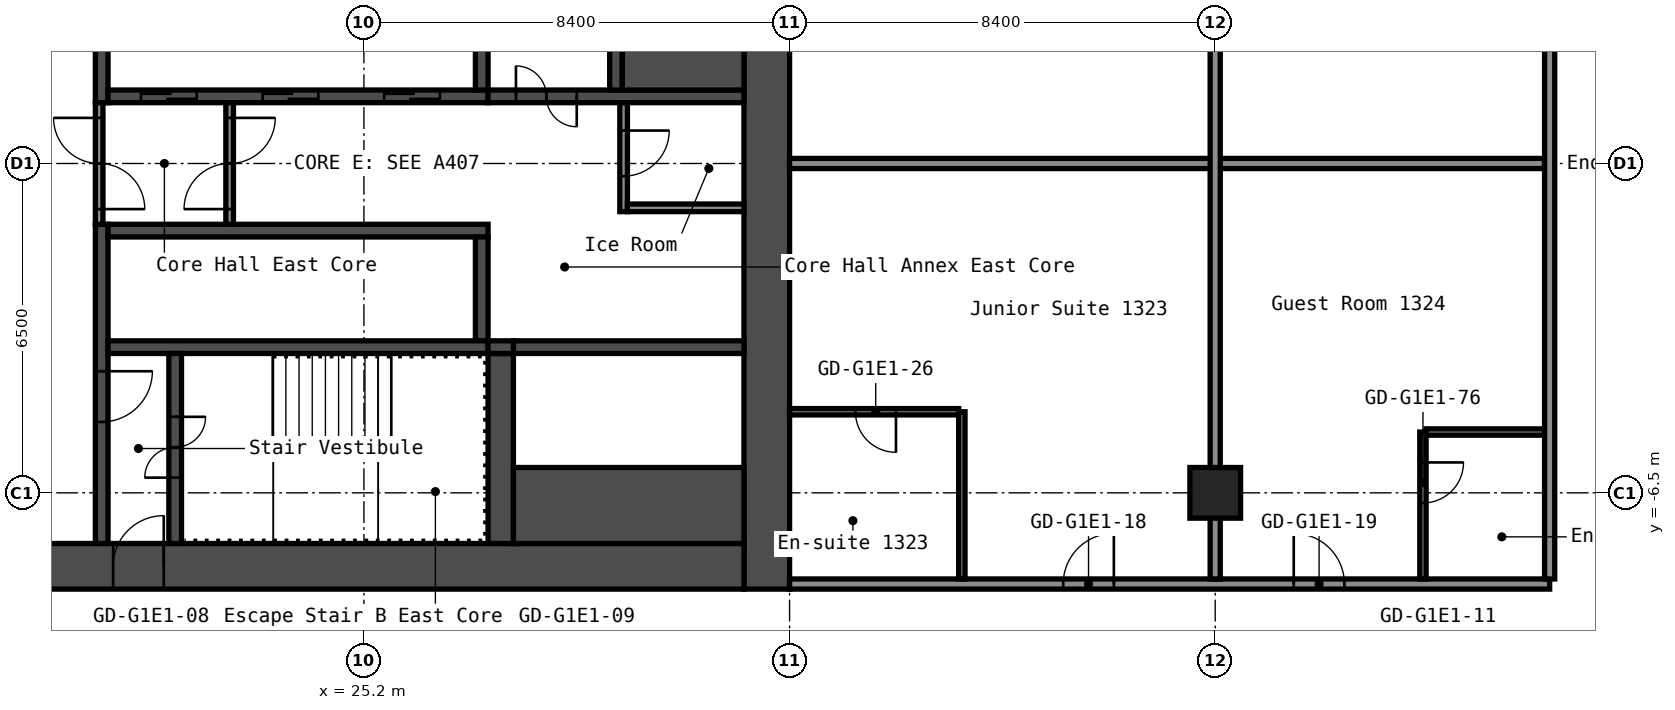
"""IFC4 building model, lengths in metres.
Left out: names, types, materials, properties, quantities, classifications, styles, units other than length and angle.
Written with IfcOpenShell. Run it as: python <this file> out.ifc"""

import sys

from ifc_helpers import new_model, si_unit, direction, frame, frame_2d, origin, origin_2d, place, context, subcontext, project, spatial, rectangle, hollow_rectangle, extrude, element, fill, save


model = new_model("IFC4")
c1 = context("Model", 3, precision=1e-05, world=origin(), true_north=direction((0.0, 1.0)))
c2 = subcontext(c1, "Body", "Model", "MODEL_VIEW")
j1 = project(units=[si_unit("LENGTHUNIT", "METRE"), si_unit("PLANEANGLEUNIT", "RADIAN")], contexts=[c1])
p1 = place(None, origin())
s1 = spatial("IfcSite", under=j1, at=p1, CompositionType="ELEMENT")
p2 = place(p1, origin())
s2 = spatial("IfcBuilding", under=s1, at=p2, CompositionType="ELEMENT")
p3 = place(p2, frame((0.0, 0.0, 48.6)))
s3 = spatial("IfcBuildingStorey", under=s2, at=p3, CompositionType="ELEMENT", Elevation=48.6)
p4 = place(p3, frame((42.0, -6.5, 0.0), z_axis=(0.0, 0.0, 1.0), x_axis=(1.0, 0.0, 0.0)))
e1 = element("IfcColumn", 1, at=p4, inside=s3, PredefinedType="COLUMN", context=c2, shape_type="SweptSolid", body=[
    extrude(hollow_rectangle(XDim=1.0, YDim=1.0, WallThickness=0.04, at=origin_2d()), origin(), (0.0, 0.0, 1.0), 2.8),
])
p5 = place(p3, frame((33.15, -8.4, 0.0), z_axis=(0.0, 0.0, 1.0), x_axis=(0.0, 1.0, 0.0)))
e2 = element("IfcWall", 2, at=p5, inside=s3, PredefinedType="SHEAR", context=c2, shape_type="SweptSolid", body=[
    extrude(rectangle(XDim=16.8, YDim=0.9, at=frame_2d((8.4, 0.0))), origin(), (0.0, 0.0, 1.0), 2.8),
])
p6 = place(p3, frame((17.7, -7.95, 0.0), z_axis=(0.0, 0.0, 1.0), x_axis=(1.0, 0.0, 0.0)))
e3 = element("IfcWall", 3, at=p6, inside=s3, PredefinedType="SHEAR", context=c2, shape_type="SweptSolid", body=[
    extrude(rectangle(XDim=15.0, YDim=0.9, at=frame_2d((7.5, 0.0))), origin(), (0.0, 0.0, 1.0), 2.8),
])
p7 = place(p6, frame((2.55, 0.0, 0.0)))
e4 = element("IfcOpeningElement", 4, at=p7, cuts=e3, PredefinedType="OPENING", context=c2, shape_type="SweptSolid", body=[
    extrude(rectangle(XDim=1.0, YDim=2.1, at=frame_2d((0.5, 1.05))), frame((0.0, 0.46, 0.0), z_axis=(0.0, -1.0, 0.0), x_axis=(1.0, 0.0, 0.0)), (0.0, 0.0, 1.0), 0.92),
])
p8 = place(p3, frame((20.025, 1.2, 0.0), z_axis=(0.0, 0.0, 1.0), x_axis=(0.0, 1.0, 0.0)))
e5 = element("IfcWall", 5, at=p8, inside=s3, PredefinedType="SHEAR", context=c2, shape_type="SweptSolid", body=[
    extrude(rectangle(XDim=6.3, YDim=0.25, at=frame_2d((3.15, 0.0))), origin(), (0.0, 0.0, 1.0), 2.8),
])
p9 = place(p3, frame((20.025, -7.5, 0.0), z_axis=(0.0, 0.0, 1.0), x_axis=(0.0, 1.0, 0.0)))
e6 = element("IfcWall", 6, at=p9, inside=s3, PredefinedType="SHEAR", context=c2, shape_type="SweptSolid", body=[
    extrude(rectangle(XDim=6.3, YDim=0.25, at=frame_2d((3.15, 0.0))), origin(), (0.0, 0.0, 1.0), 2.8),
])
p10 = place(p9, frame((2.4, 0.0, 0.0)))
e7 = element("IfcOpeningElement", 7, at=p10, cuts=e6, PredefinedType="OPENING", context=c2, shape_type="SweptSolid", body=[
    extrude(rectangle(XDim=1.0, YDim=2.1, at=frame_2d((0.5, 1.05))), frame((0.0, 0.135, 0.0), z_axis=(0.0, -1.0, 0.0), x_axis=(1.0, 0.0, 0.0)), (0.0, 0.0, 1.0), 0.27),
])
p11 = place(p3, frame((20.15, 1.325, 0.0), z_axis=(0.0, 0.0, 1.0), x_axis=(1.0, 0.0, 0.0)))
e8 = element("IfcWall", 8, at=p11, inside=s3, PredefinedType="SHEAR", context=c2, shape_type="SweptSolid", body=[
    extrude(rectangle(XDim=7.5, YDim=0.25, at=frame_2d((3.75, 0.0))), origin(), (0.0, 0.0, 1.0), 2.8),
])
p12 = place(p11, frame((0.65, 0.0, 0.0)))
e9 = element("IfcOpeningElement", 9, at=p12, cuts=e8, PredefinedType="OPENING", context=c2, shape_type="SweptSolid", body=[
    extrude(rectangle(XDim=1.1, YDim=2.1, at=frame_2d((0.55, 1.05))), frame((0.0, 0.135, 0.0), z_axis=(0.0, -1.0, 0.0), x_axis=(1.0, 0.0, 0.0)), (0.0, 0.0, 1.0), 0.27),
])
p13 = place(p11, frame((3.05, 0.0, 0.0)))
e10 = element("IfcOpeningElement", 10, at=p13, cuts=e8, PredefinedType="OPENING", context=c2, shape_type="SweptSolid", body=[
    extrude(rectangle(XDim=1.1, YDim=2.1, at=frame_2d((0.55, 1.05))), frame((0.0, 0.135, 0.0), z_axis=(0.0, -1.0, 0.0), x_axis=(1.0, 0.0, 0.0)), (0.0, 0.0, 1.0), 0.27),
])
p14 = place(p11, frame((5.45, 0.0, 0.0)))
e11 = element("IfcOpeningElement", 11, at=p14, cuts=e8, PredefinedType="OPENING", context=c2, shape_type="SweptSolid", body=[
    extrude(rectangle(XDim=1.1, YDim=2.1, at=frame_2d((0.55, 1.05))), frame((0.0, 0.135, 0.0), z_axis=(0.0, -1.0, 0.0), x_axis=(1.0, 0.0, 0.0)), (0.0, 0.0, 1.0), 0.27),
])
p15 = place(p3, frame((27.525, 1.45, 0.0), z_axis=(0.0, 0.0, 1.0), x_axis=(0.0, 1.0, 0.0)))
e12 = element("IfcWall", 12, at=p15, inside=s3, PredefinedType="SHEAR", context=c2, shape_type="SweptSolid", body=[
    extrude(rectangle(XDim=2.05, YDim=0.25, at=frame_2d((1.025, 0.0))), origin(), (0.0, 0.0, 1.0), 2.8),
])
p16 = place(p3, frame((27.65, 1.325, 0.0), z_axis=(0.0, 0.0, 1.0), x_axis=(1.0, 0.0, 0.0)))
e13 = element("IfcWall", 13, at=p16, inside=s3, PredefinedType="SHEAR", context=c2, shape_type="SweptSolid", body=[
    extrude(rectangle(XDim=5.05, YDim=0.25, at=frame_2d((2.525, 0.0))), origin(), (0.0, 0.0, 1.0), 2.8),
])
p17 = place(p16, frame((0.55, 0.0, 0.0)))
e14 = element("IfcOpeningElement", 14, at=p17, cuts=e13, PredefinedType="OPENING", context=c2, shape_type="SweptSolid", body=[
    extrude(rectangle(XDim=1.2, YDim=2.1, at=frame_2d((0.6, 1.05))), frame((0.0, 0.135, 0.0), z_axis=(0.0, -1.0, 0.0), x_axis=(1.0, 0.0, 0.0)), (0.0, 0.0, 1.0), 0.27),
])
p18 = place(p3, frame((30.175, 1.45, 0.0), z_axis=(0.0, 0.0, 1.0), x_axis=(0.0, 1.0, 0.0)))
e15 = element("IfcWall", 15, at=p18, inside=s3, PredefinedType="SHEAR", context=c2, shape_type="SweptSolid", body=[
    extrude(rectangle(XDim=6.05, YDim=0.25, at=frame_2d((3.025, 0.0))), origin(), (0.0, 0.0, 1.0), 2.8),
])
p19 = place(p18, frame((2.625, 0.0, 0.0)))
e16 = element("IfcOpeningElement", 16, at=p19, cuts=e15, PredefinedType="OPENING", context=c2, shape_type="SweptSolid", body=[
    extrude(rectangle(XDim=1.1, YDim=2.1, at=frame_2d((0.55, 1.05))), frame((0.0, 0.135, 0.0), z_axis=(0.0, -1.0, 0.0), x_axis=(1.0, 0.0, 0.0)), (0.0, 0.0, 1.0), 0.27),
])
p20 = place(p3, frame((30.3, 2.375, 0.0), z_axis=(0.0, 0.0, 1.0), x_axis=(1.0, 0.0, 0.0)))
e17 = element("IfcWall", 17, at=p20, inside=s3, PredefinedType="SHEAR", context=c2, shape_type="SweptSolid", body=[
    extrude(rectangle(XDim=2.4, YDim=1.85, at=frame_2d((1.2, 0.0))), origin(), (0.0, 0.0, 1.0), 2.8),
])
p21 = place(p3, frame((20.15, -1.325, 0.0), z_axis=(0.0, 0.0, 1.0), x_axis=(1.0, 0.0, 0.0)))
e18 = element("IfcWall", 18, at=p21, inside=s3, PredefinedType="SHEAR", context=c2, shape_type="SweptSolid", body=[
    extrude(rectangle(XDim=7.5, YDim=0.25, at=frame_2d((3.75, 0.0))), origin(), (0.0, 0.0, 1.0), 2.8),
])
p22 = place(p3, frame((27.525, -3.5, 0.0), z_axis=(0.0, 0.0, 1.0), x_axis=(0.0, 1.0, 0.0)))
e19 = element("IfcWall", 19, at=p22, inside=s3, PredefinedType="SHEAR", context=c2, shape_type="SweptSolid", body=[
    extrude(rectangle(XDim=2.05, YDim=0.25, at=frame_2d((1.025, 0.0))), origin(), (0.0, 0.0, 1.0), 2.8),
])
p23 = place(p3, frame((20.15, -3.625, 0.0), z_axis=(0.0, 0.0, 1.0), x_axis=(1.0, 0.0, 0.0)))
e20 = element("IfcWall", 20, at=p23, inside=s3, PredefinedType="SHEAR", context=c2, shape_type="SweptSolid", body=[
    extrude(rectangle(XDim=7.5, YDim=0.25, at=frame_2d((3.75, 0.0))), origin(), (0.0, 0.0, 1.0), 2.8),
])
p24 = place(p3, frame((21.475, -7.5, 0.0), z_axis=(0.0, 0.0, 1.0), x_axis=(0.0, 1.0, 0.0)))
e21 = element("IfcWall", 21, at=p24, inside=s3, PredefinedType="SHEAR", context=c2, shape_type="SweptSolid", body=[
    extrude(rectangle(XDim=3.75, YDim=0.25, at=frame_2d((1.875, 0.0))), origin(), (0.0, 0.0, 1.0), 2.8),
])
p25 = place(p24, frame((1.3, 0.0, 0.0)))
e22 = element("IfcOpeningElement", 22, at=p25, cuts=e21, PredefinedType="OPENING", context=c2, shape_type="SweptSolid", body=[
    extrude(rectangle(XDim=1.2, YDim=2.1, at=frame_2d((0.6, 1.05))), frame((0.0, 0.135, 0.0), z_axis=(0.0, -1.0, 0.0), x_axis=(1.0, 0.0, 0.0)), (0.0, 0.0, 1.0), 0.27),
])
p26 = place(p3, frame((27.9, -7.5, 0.0), z_axis=(0.0, 0.0, 1.0), x_axis=(0.0, 1.0, 0.0)))
e23 = element("IfcWall", 23, at=p26, inside=s3, PredefinedType="SHEAR", context=c2, shape_type="SweptSolid", body=[
    extrude(rectangle(XDim=3.75, YDim=0.5, at=frame_2d((1.875, 0.0))), origin(), (0.0, 0.0, 1.0), 2.8),
])
p27 = place(p3, frame((28.15, -3.625, 0.0), z_axis=(0.0, 0.0, 1.0), x_axis=(1.0, 0.0, 0.0)))
e24 = element("IfcWall", 24, at=p27, inside=s3, PredefinedType="SHEAR", context=c2, shape_type="SweptSolid", body=[
    extrude(rectangle(XDim=4.55, YDim=0.25, at=frame_2d((2.275, 0.0))), origin(), (0.0, 0.0, 1.0), 2.8),
])
p28 = place(p3, frame((28.15, -6.75, 0.0), z_axis=(0.0, 0.0, 1.0), x_axis=(1.0, 0.0, 0.0)))
e25 = element("IfcWall", 25, at=p28, inside=s3, PredefinedType="SHEAR", context=c2, shape_type="SweptSolid", body=[
    extrude(rectangle(XDim=4.55, YDim=1.5, at=frame_2d((2.275, 0.0))), origin(), (0.0, 0.0, 1.0), 2.8),
])
p29 = place(p3, frame((27.65, -3.625, 0.0), z_axis=(0.0, 0.0, 1.0), x_axis=(1.0, 0.0, 0.0)))
e26 = element("IfcWall", 26, at=p29, inside=s3, PredefinedType="SHEAR", context=c2, shape_type="SweptSolid", body=[
    extrude(rectangle(XDim=0.5, YDim=0.25, at=frame_2d((0.25, 0.0))), origin(), (0.0, 0.0, 1.0), 2.8),
])
p30 = place(p3, frame((19.975, -1.2, 0.0), z_axis=(0.0, 0.0, 1.0), x_axis=(0.0, 1.0, 0.0)))
e27 = element("IfcWall", 27, at=p30, inside=s3, PredefinedType="PARTITIONING", context=c2, shape_type="SweptSolid", body=[
    extrude(rectangle(XDim=2.4, YDim=0.15, at=frame_2d((1.2, 0.0))), origin(), (0.0, 0.0, 1.0), 2.8),
])
p31 = place(p30, frame((0.3, 0.0, 0.0)))
e28 = element("IfcOpeningElement", 28, at=p31, cuts=e27, PredefinedType="OPENING", context=c2, shape_type="SweptSolid", body=[
    extrude(rectangle(XDim=1.8, YDim=2.1, at=frame_2d((0.9, 1.05))), frame((0.0, 0.085, 0.0), z_axis=(0.0, -1.0, 0.0), x_axis=(1.0, 0.0, 0.0)), (0.0, 0.0, 1.0), 0.17),
])
p32 = place(p3, frame((22.55, -1.2, 0.0), z_axis=(0.0, 0.0, 1.0), x_axis=(0.0, 1.0, 0.0)))
e29 = element("IfcWall", 29, at=p32, inside=s3, PredefinedType="PARTITIONING", context=c2, shape_type="SweptSolid", body=[
    extrude(rectangle(XDim=2.4, YDim=0.15, at=frame_2d((1.2, 0.0))), origin(), (0.0, 0.0, 1.0), 2.8),
])
p33 = place(p32, frame((0.3, 0.0, 0.0)))
e30 = element("IfcOpeningElement", 30, at=p33, cuts=e29, PredefinedType="OPENING", context=c2, shape_type="SweptSolid", body=[
    extrude(rectangle(XDim=1.8, YDim=2.1, at=frame_2d((0.9, 1.05))), frame((0.0, 0.085, 0.0), z_axis=(0.0, -1.0, 0.0), x_axis=(1.0, 0.0, 0.0)), (0.0, 0.0, 1.0), 0.17),
])
p34 = place(p3, frame((30.325, -0.95, 0.0), z_axis=(0.0, 0.0, 1.0), x_axis=(0.0, 1.0, 0.0)))
e31 = element("IfcWall", 31, at=p34, inside=s3, PredefinedType="PARTITIONING", context=c2, shape_type="SweptSolid", body=[
    extrude(rectangle(XDim=2.15, YDim=0.15, at=frame_2d((1.075, 0.0))), origin(), (0.0, 0.0, 1.0), 2.8),
])
p35 = place(p34, frame((0.7, 0.0, 0.0)))
e32 = element("IfcOpeningElement", 32, at=p35, cuts=e31, PredefinedType="OPENING", context=c2, shape_type="SweptSolid", body=[
    extrude(rectangle(XDim=0.9, YDim=2.1, at=frame_2d((0.45, 1.05))), frame((0.0, 0.085, 0.0), z_axis=(0.0, -1.0, 0.0), x_axis=(1.0, 0.0, 0.0)), (0.0, 0.0, 1.0), 0.17),
])
p36 = place(p3, frame((30.4, -0.875, 0.0), z_axis=(0.0, 0.0, 1.0), x_axis=(1.0, 0.0, 0.0)))
e33 = element("IfcWall", 33, at=p36, inside=s3, PredefinedType="PARTITIONING", context=c2, shape_type="SweptSolid", body=[
    extrude(rectangle(XDim=2.3, YDim=0.15, at=frame_2d((1.15, 0.0))), origin(), (0.0, 0.0, 1.0), 2.8),
])
p37 = place(p3, frame((33.6, -8.3, 0.0), z_axis=(0.0, 0.0, 1.0), x_axis=(1.0, 0.0, 0.0)))
e34 = element("IfcWall", 34, at=p37, inside=s3, PredefinedType="PARTITIONING", context=c2, shape_type="SweptSolid", body=[
    extrude(rectangle(XDim=15.0, YDim=0.2, at=frame_2d((7.5, 0.0))), origin(), (0.0, 0.0, 1.0), 2.8),
])
p38 = place(p37, frame((5.4, 0.0, 0.0)))
e35 = element("IfcOpeningElement", 35, at=p38, cuts=e34, PredefinedType="OPENING", context=c2, shape_type="SweptSolid", body=[
    extrude(rectangle(XDim=1.0, YDim=2.1, at=frame_2d((0.5, 1.05))), frame((0.0, 0.11, 0.0), z_axis=(0.0, -1.0, 0.0), x_axis=(1.0, 0.0, 0.0)), (0.0, 0.0, 1.0), 0.22),
])
p39 = place(p37, frame((9.95, 0.0, 0.0)))
e36 = element("IfcOpeningElement", 36, at=p39, cuts=e34, PredefinedType="OPENING", context=c2, shape_type="SweptSolid", body=[
    extrude(rectangle(XDim=1.0, YDim=2.1, at=frame_2d((0.5, 1.05))), frame((0.0, 0.11, 0.0), z_axis=(0.0, -1.0, 0.0), x_axis=(1.0, 0.0, 0.0)), (0.0, 0.0, 1.0), 0.22),
])
p40 = place(p3, frame((46.163, -5.3, 0.0), z_axis=(0.0, 0.0, 1.0), x_axis=(1.0, 0.0, 0.0)))
e37 = element("IfcWall", 37, at=p40, inside=s3, PredefinedType="PARTITIONING", context=c2, shape_type="SweptSolid", body=[
    extrude(rectangle(XDim=2.337, YDim=0.125, at=frame_2d((1.169, 0.0))), origin(), (0.0, 0.0, 1.0), 2.8),
])
p41 = place(p3, frame((33.6, -4.9, 0.0), z_axis=(0.0, 0.0, 1.0), x_axis=(1.0, 0.0, 0.0)))
e38 = element("IfcWall", 38, at=p41, inside=s3, PredefinedType="PARTITIONING", context=c2, shape_type="SweptSolid", body=[
    extrude(rectangle(XDim=3.337, YDim=0.125, at=frame_2d((1.669, 0.0))), origin(), (0.0, 0.0, 1.0), 2.8),
])
p42 = place(p41, frame((1.3, 0.0, 0.0)))
e39 = element("IfcOpeningElement", 39, at=p42, cuts=e38, PredefinedType="OPENING", context=c2, shape_type="SweptSolid", body=[
    extrude(rectangle(XDim=0.8, YDim=2.1, at=frame_2d((0.4, 1.05))), frame((0.0, 0.073, 0.0), z_axis=(0.0, -1.0, 0.0), x_axis=(1.0, 0.0, 0.0)), (0.0, 0.0, 1.0), 0.145),
])
p43 = place(p3, frame((33.6, 0.0, 0.0), z_axis=(0.0, 0.0, 1.0), x_axis=(1.0, 0.0, 0.0)))
e40 = element("IfcWall", 40, at=p43, inside=s3, PredefinedType="PARTITIONING", context=c2, shape_type="SweptSolid", body=[
    extrude(rectangle(XDim=14.9, YDim=0.2, at=frame_2d((7.45, 0.0))), origin(), (0.0, 0.0, 1.0), 2.8),
])
p44 = place(p3, frame((37.0, -8.2, 0.0), z_axis=(0.0, 0.0, 1.0), x_axis=(0.0, 1.0, 0.0)))
e41 = element("IfcWall", 41, at=p44, inside=s3, PredefinedType="PARTITIONING", context=c2, shape_type="SweptSolid", body=[
    extrude(rectangle(XDim=3.3, YDim=0.125, at=frame_2d((1.65, 0.0))), origin(), (0.0, 0.0, 1.0), 2.8),
])
p45 = place(p3, frame((42.0, -8.2, 0.0), z_axis=(0.0, 0.0, 1.0), x_axis=(0.0, 1.0, 0.0)))
e42 = element("IfcWall", 42, at=p45, inside=s3, PredefinedType="PARTITIONING", context=c2, shape_type="SweptSolid", body=[
    extrude(rectangle(XDim=16.4, YDim=0.2, at=frame_2d((8.2, 0.0))), origin(), (0.0, 0.0, 1.0), 2.8),
])
p46 = place(p3, frame((46.1, -8.2, 0.0), z_axis=(0.0, 0.0, 1.0), x_axis=(0.0, 1.0, 0.0)))
e43 = element("IfcWall", 43, at=p46, inside=s3, PredefinedType="PARTITIONING", context=c2, shape_type="SweptSolid", body=[
    extrude(rectangle(XDim=2.9, YDim=0.125, at=frame_2d((1.45, 0.0))), origin(), (0.0, 0.0, 1.0), 2.8),
])
p47 = place(p46, frame((1.5, 0.0, 0.0)))
e44 = element("IfcOpeningElement", 44, at=p47, cuts=e43, PredefinedType="OPENING", context=c2, shape_type="SweptSolid", body=[
    extrude(rectangle(XDim=0.8, YDim=2.1, at=frame_2d((0.4, 1.05))), frame((0.0, 0.073, 0.0), z_axis=(0.0, -1.0, 0.0), x_axis=(1.0, 0.0, 0.0)), (0.0, 0.0, 1.0), 0.145),
])
p48 = place(p3, frame((48.6, -8.2, 0.0), z_axis=(0.0, 0.0, 1.0), x_axis=(0.0, 1.0, 0.0)))
e45 = element("IfcWall", 45, at=p48, inside=s3, PredefinedType="PARTITIONING", context=c2, shape_type="SweptSolid", body=[
    extrude(rectangle(XDim=16.4, YDim=0.2, at=frame_2d((8.2, 0.0))), origin(), (0.0, 0.0, 1.0), 2.8),
])
p49 = place(p7, origin())
e46 = element("IfcDoor", 46, at=p49, inside=s3, OperationType="SINGLE_SWING_LEFT", PredefinedType="DOOR", context=c2, shape_type="SweptSolid", body=[
    extrude(rectangle(XDim=1.0, YDim=2.1, at=frame_2d((0.5, 1.05))), frame((0.0, 0.025, 0.0), z_axis=(0.0, -1.0, 0.0), x_axis=(1.0, 0.0, 0.0)), (0.0, 0.0, 1.0), 0.05),
])
fill(e4, e46)
p50 = place(p25, origin())
e47 = element("IfcDoor", 47, at=p50, inside=s3, OperationType="DOUBLE_DOOR_SINGLE_SWING", PredefinedType="DOOR", context=c2, shape_type="SweptSolid", body=[
    extrude(rectangle(XDim=1.2, YDim=2.1, at=frame_2d((0.6, 1.05))), frame((0.0, 0.025, 0.0), z_axis=(0.0, -1.0, 0.0), x_axis=(1.0, 0.0, 0.0)), (0.0, 0.0, 1.0), 0.05),
])
fill(e22, e47)
p51 = place(p10, origin())
e48 = element("IfcDoor", 48, at=p51, inside=s3, OperationType="SINGLE_SWING_RIGHT", PredefinedType="DOOR", context=c2, shape_type="SweptSolid", body=[
    extrude(rectangle(XDim=1.0, YDim=2.1, at=frame_2d((0.5, 1.05))), frame((0.0, 0.025, 0.0), z_axis=(0.0, -1.0, 0.0), x_axis=(1.0, 0.0, 0.0)), (0.0, 0.0, 1.0), 0.05),
])
fill(e7, e48)
p52 = place(p17, origin())
e49 = element("IfcDoor", 49, at=p52, inside=s3, OperationType="DOUBLE_DOOR_SINGLE_SWING", PredefinedType="DOOR", context=c2, shape_type="SweptSolid", body=[
    extrude(rectangle(XDim=1.2, YDim=2.1, at=frame_2d((0.6, 1.05))), frame((0.0, 0.025, 0.0), z_axis=(0.0, -1.0, 0.0), x_axis=(1.0, 0.0, 0.0)), (0.0, 0.0, 1.0), 0.05),
])
fill(e14, e49)
p53 = place(p31, origin())
e50 = element("IfcDoor", 50, at=p53, inside=s3, OperationType="DOUBLE_DOOR_SINGLE_SWING", PredefinedType="DOOR", context=c2, shape_type="SweptSolid", body=[
    extrude(rectangle(XDim=1.8, YDim=2.1, at=frame_2d((0.9, 1.05))), frame((0.0, 0.025, 0.0), z_axis=(0.0, -1.0, 0.0), x_axis=(1.0, 0.0, 0.0)), (0.0, 0.0, 1.0), 0.05),
])
fill(e28, e50)
p54 = place(p33, origin())
e51 = element("IfcDoor", 51, at=p54, inside=s3, OperationType="DOUBLE_DOOR_SINGLE_SWING", PredefinedType="DOOR", context=c2, shape_type="SweptSolid", body=[
    extrude(rectangle(XDim=1.8, YDim=2.1, at=frame_2d((0.9, 1.05))), frame((0.0, 0.025, 0.0), z_axis=(0.0, -1.0, 0.0), x_axis=(1.0, 0.0, 0.0)), (0.0, 0.0, 1.0), 0.05),
])
fill(e30, e51)
p55 = place(p35, origin())
e52 = element("IfcDoor", 52, at=p55, inside=s3, OperationType="SINGLE_SWING_RIGHT", PredefinedType="DOOR", context=c2, shape_type="SweptSolid", body=[
    extrude(rectangle(XDim=0.9, YDim=2.1, at=frame_2d((0.45, 1.05))), frame((0.0, 0.025, 0.0), z_axis=(0.0, -1.0, 0.0), x_axis=(1.0, 0.0, 0.0)), (0.0, 0.0, 1.0), 0.05),
])
fill(e32, e52)
p56 = place(p12, origin())
e53 = element("IfcDoor", 53, at=p56, inside=s3, OperationType="DOUBLE_DOOR_SLIDING", PredefinedType="DOOR", context=c2, shape_type="SweptSolid", body=[
    extrude(rectangle(XDim=1.1, YDim=2.1, at=frame_2d((0.55, 1.05))), frame((0.0, 0.025, 0.0), z_axis=(0.0, -1.0, 0.0), x_axis=(1.0, 0.0, 0.0)), (0.0, 0.0, 1.0), 0.05),
])
fill(e9, e53)
p57 = place(p13, origin())
e54 = element("IfcDoor", 54, at=p57, inside=s3, OperationType="DOUBLE_DOOR_SLIDING", PredefinedType="DOOR", context=c2, shape_type="SweptSolid", body=[
    extrude(rectangle(XDim=1.1, YDim=2.1, at=frame_2d((0.55, 1.05))), frame((0.0, 0.025, 0.0), z_axis=(0.0, -1.0, 0.0), x_axis=(1.0, 0.0, 0.0)), (0.0, 0.0, 1.0), 0.05),
])
fill(e10, e54)
p58 = place(p14, origin())
e55 = element("IfcDoor", 55, at=p58, inside=s3, OperationType="DOUBLE_DOOR_SLIDING", PredefinedType="DOOR", context=c2, shape_type="SweptSolid", body=[
    extrude(rectangle(XDim=1.1, YDim=2.1, at=frame_2d((0.55, 1.05))), frame((0.0, 0.025, 0.0), z_axis=(0.0, -1.0, 0.0), x_axis=(1.0, 0.0, 0.0)), (0.0, 0.0, 1.0), 0.05),
])
fill(e11, e55)
p59 = place(p38, origin())
e56 = element("IfcDoor", 56, at=p59, inside=s3, OperationType="SINGLE_SWING_LEFT", PredefinedType="DOOR", context=c2, shape_type="SweptSolid", body=[
    extrude(rectangle(XDim=1.0, YDim=2.1, at=frame_2d((0.5, 1.05))), frame((0.0, 0.025, 0.0), z_axis=(0.0, -1.0, 0.0), x_axis=(1.0, 0.0, 0.0)), (0.0, 0.0, 1.0), 0.05),
])
fill(e35, e56)
p60 = place(p39, origin())
e57 = element("IfcDoor", 57, at=p60, inside=s3, OperationType="SINGLE_SWING_RIGHT", PredefinedType="DOOR", context=c2, shape_type="SweptSolid", body=[
    extrude(rectangle(XDim=1.0, YDim=2.1, at=frame_2d((0.5, 1.05))), frame((0.0, 0.025, 0.0), z_axis=(0.0, -1.0, 0.0), x_axis=(1.0, 0.0, 0.0)), (0.0, 0.0, 1.0), 0.05),
])
fill(e36, e57)
p61 = place(p42, origin())
e58 = element("IfcDoor", 58, at=p61, inside=s3, OperationType="SINGLE_SWING_RIGHT", PredefinedType="DOOR", context=c2, shape_type="SweptSolid", body=[
    extrude(rectangle(XDim=0.8, YDim=2.1, at=frame_2d((0.4, 1.05))), frame((0.0, 0.025, 0.0), z_axis=(0.0, -1.0, 0.0), x_axis=(1.0, 0.0, 0.0)), (0.0, 0.0, 1.0), 0.05),
])
fill(e39, e58)
p62 = place(p47, origin())
e59 = element("IfcDoor", 59, at=p62, inside=s3, OperationType="SINGLE_SWING_RIGHT", PredefinedType="DOOR", context=c2, shape_type="SweptSolid", body=[
    extrude(rectangle(XDim=0.8, YDim=2.1, at=frame_2d((0.4, 1.05))), frame((0.0, 0.025, 0.0), z_axis=(0.0, -1.0, 0.0), x_axis=(1.0, 0.0, 0.0)), (0.0, 0.0, 1.0), 0.05),
])
fill(e44, e59)
save(model, sys.argv[1])
